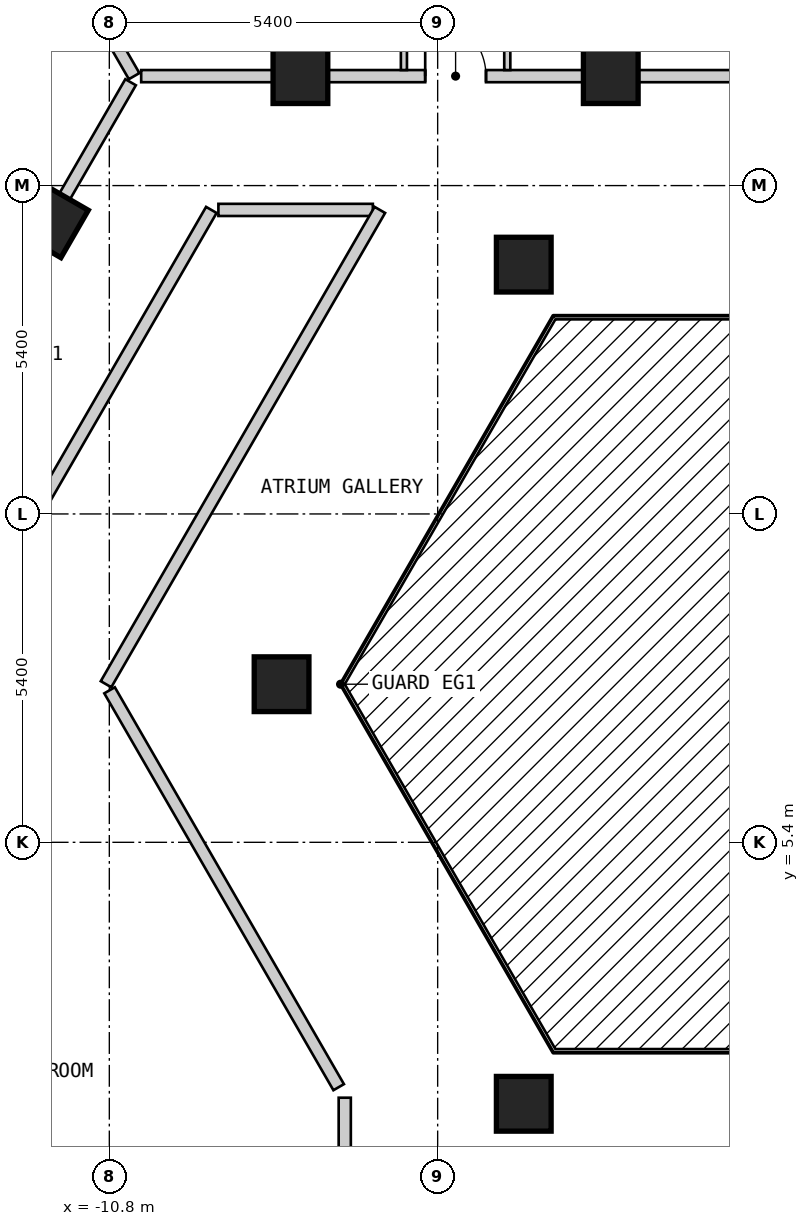
"""IFC4 building model, lengths in metres.
Left out: names, types, materials, properties, quantities, classifications, styles, units other than length and angle.
Written with IfcOpenShell. Run it as: python <this file> out.ifc"""

import sys

from ifc_helpers import new_model, si_unit, direction, frame, frame_2d, origin, origin_2d, place, context, subcontext, project, spatial, rectangle, extrude, element, fill, save


model = new_model("IFC4")
c1 = context("Model", 3, precision=1e-05, world=origin(), true_north=direction((0.0, 1.0)))
c2 = subcontext(c1, "Body", "Model", "MODEL_VIEW")
j1 = project(units=[si_unit("LENGTHUNIT", "METRE"), si_unit("PLANEANGLEUNIT", "RADIAN")], contexts=[c1])
p1 = place(None, origin())
s1 = spatial("IfcSite", under=j1, at=p1, CompositionType="ELEMENT")
p2 = place(p1, origin())
s2 = spatial("IfcBuilding", under=s1, at=p2, CompositionType="ELEMENT")
p3 = place(p2, frame((0.0, 0.0, 47.4)))
s3 = spatial("IfcBuildingStorey", under=s2, at=p3, CompositionType="ELEMENT", Elevation=47.4)
for number, where, z_axis, x_axis in (
    (1, (-2.553, 18.0, 0.0), (0.0, 0.0, 1.0), (-1.0, 0.0, 0.0)),
    (2, (-3.984, 14.9, 0.0), (0.0, 0.0, 1.0), (1.0, 0.0, 0.0)),
    (3, (-7.657, 18.0, 0.0), (0.0, 0.0, 1.0), (-1.0, 0.0, 0.0)),
    (4, (-11.761, 15.63, 0.0), (0.0, 0.0, 1.0), (-0.5, -0.866, 0.0)),
    (5, (-7.967, 8.0, 0.0), (0.0, 0.0, 1.0), (1.0, 0.0, 0.0)),
    (6, (-3.984, 1.1, 0.0), (0.0, 0.0, 1.0), (1.0, 0.0, 0.0)),
):
    element("IfcColumn", number, at=place(p3, frame(where, z_axis=z_axis, x_axis=x_axis)), inside=s3, PredefinedType="COLUMN", context=c2, shape_type="SweptSolid", body=[
        extrude(rectangle(XDim=0.9, YDim=0.9, at=origin_2d()), origin(), (0.0, 0.0, 1.0), 3.0),
    ])
p4 = place(p3, frame((-10.796, 7.9, 0.0), z_axis=(0.0, 0.0, 1.0), x_axis=(0.499954271211, -0.866051803703, 0.0)))
e7 = element("IfcWall", 7, at=p4, inside=s3, PredefinedType="PARTITIONING", context=c2, shape_type="SweptSolid", body=[
    extrude(rectangle(XDim=7.536, YDim=0.2, at=frame_2d((3.768, 0.0))), origin(), (0.0, 0.0, 1.0), 2.7),
])
p5 = place(p3, frame((-9.006, 15.8, 0.0), z_axis=(0.0, 0.0, 1.0), x_axis=(1.0, 0.0, 0.0)))
e8 = element("IfcWall", 8, at=p5, inside=s3, PredefinedType="PARTITIONING", context=c2, shape_type="SweptSolid", body=[
    extrude(rectangle(XDim=2.54, YDim=0.2, at=frame_2d((1.27, 0.0))), origin(), (0.0, 0.0, 1.0), 2.7),
])
p6 = place(p3, frame((-10.276, 18.0, 0.0), z_axis=(0.0, 0.0, 1.0), x_axis=(1.0, 0.0, 0.0)))
e9 = element("IfcWall", 9, at=p6, inside=s3, PredefinedType="PARTITIONING", context=c2, shape_type="SweptSolid", body=[
    extrude(rectangle(XDim=20.558, YDim=0.2, at=frame_2d((10.279, 0.0))), origin(), (0.0, 0.0, 1.0), 2.7),
])
p7 = place(p6, frame((19.265, 0.0, 0.0)))
e10 = element("IfcOpeningElement", 10, at=p7, cuts=e9, PredefinedType="OPENING", context=c2, shape_type="SweptSolid", body=[
    extrude(rectangle(XDim=1.0, YDim=2.1, at=frame_2d((0.5, 1.05))), frame((0.0, 0.11, 0.0), z_axis=(0.0, -1.0, 0.0), x_axis=(1.0, 0.0, 0.0)), (0.0, 0.0, 1.0), 0.22),
])
p8 = place(p6, frame((14.879, 0.0, 0.0)))
e11 = element("IfcOpeningElement", 11, at=p8, cuts=e9, PredefinedType="OPENING", context=c2, shape_type="SweptSolid", body=[
    extrude(rectangle(XDim=1.0, YDim=2.1, at=frame_2d((0.5, 1.05))), frame((0.0, 0.11, 0.0), z_axis=(0.0, -1.0, 0.0), x_axis=(1.0, 0.0, 0.0)), (0.0, 0.0, 1.0), 0.22),
])
p9 = place(p6, frame((4.671, 0.0, 0.0)))
e12 = element("IfcOpeningElement", 12, at=p9, cuts=e9, PredefinedType="OPENING", context=c2, shape_type="SweptSolid", body=[
    extrude(rectangle(XDim=1.0, YDim=2.1, at=frame_2d((0.5, 1.05))), frame((0.0, 0.11, 0.0), z_axis=(0.0, -1.0, 0.0), x_axis=(1.0, 0.0, 0.0)), (0.0, 0.0, 1.0), 0.22),
])
p10 = place(p3, frame((-10.854, 8.0, 0.0), z_axis=(0.0, 0.0, 1.0), x_axis=(0.499964141897, 0.86604610548, 0.0)))
e13 = element("IfcWall", 13, at=p10, inside=s3, PredefinedType="PARTITIONING", context=c2, shape_type="SweptSolid", body=[
    extrude(rectangle(XDim=9.007, YDim=0.2, at=frame_2d((4.503, 0.0))), origin(), (0.0, 0.0, 1.0), 2.7),
])
p11 = place(p3, frame((-18.244, -0.001, 0.0), z_axis=(0.0, 0.0, 1.0), x_axis=(0.499962999376, 0.866046765051, 0.0)))
e14 = element("IfcWall", 14, at=p11, inside=s3, PredefinedType="PARTITIONING", context=c2, shape_type="SweptSolid", body=[
    extrude(rectangle(XDim=18.245, YDim=0.2, at=frame_2d((9.123, 0.0))), origin(), (0.0, 0.0, 1.0), 2.7),
])
p12 = place(p11, frame((8.672, 0.0, 0.0)))
e15 = element("IfcOpeningElement", 15, at=p12, cuts=e14, PredefinedType="OPENING", context=c2, shape_type="SweptSolid", body=[
    extrude(rectangle(XDim=0.9, YDim=2.1, at=frame_2d((0.45, 1.05))), frame((0.0, 0.11, 0.0), z_axis=(0.0, -1.0, 0.0), x_axis=(1.0, 0.0, 0.0)), (0.0, 0.0, 1.0), 0.22),
])
p13 = place(p3, frame((-20.727, 0.099, 0.0), z_axis=(0.0, 0.0, 1.0), x_axis=(0.499993204491, 0.866029327138, 0.0)))
e16 = element("IfcWall", 16, at=p13, inside=s3, PredefinedType="PARTITIONING", context=c2, shape_type="SweptSolid", body=[
    extrude(rectangle(XDim=20.554, YDim=0.2, at=frame_2d((10.277, 0.0))), origin(), (0.0, 0.0, 1.0), 2.7),
])
p14 = place(p13, frame((14.88, 0.0, 0.0)))
e17 = element("IfcOpeningElement", 17, at=p14, cuts=e16, PredefinedType="OPENING", context=c2, shape_type="SweptSolid", body=[
    extrude(rectangle(XDim=1.0, YDim=2.1, at=frame_2d((0.5, 1.05))), frame((0.0, 0.11, 0.0), z_axis=(0.0, -1.0, 0.0), x_axis=(1.0, 0.0, 0.0)), (0.0, 0.0, 1.0), 0.22),
])
p15 = place(p13, frame((4.673, 0.0, 0.0)))
e18 = element("IfcOpeningElement", 18, at=p15, cuts=e16, PredefinedType="OPENING", context=c2, shape_type="SweptSolid", body=[
    extrude(rectangle(XDim=1.0, YDim=2.1, at=frame_2d((0.5, 1.05))), frame((0.0, 0.11, 0.0), z_axis=(0.0, -1.0, 0.0), x_axis=(1.0, 0.0, 0.0)), (0.0, 0.0, 1.0), 0.22),
])
p16 = place(p13, frame((0.838, 0.0, 0.0)))
e19 = element("IfcOpeningElement", 19, at=p16, cuts=e16, PredefinedType="OPENING", context=c2, shape_type="SweptSolid", body=[
    extrude(rectangle(XDim=0.8, YDim=2.1, at=frame_2d((0.4, 1.05))), frame((0.0, 0.11, 0.0), z_axis=(0.0, -1.0, 0.0), x_axis=(1.0, 0.0, 0.0)), (0.0, 0.0, 1.0), 0.22),
])
p17 = place(p3, frame((-6.928, -2.8, 0.0), z_axis=(0.0, 0.0, 1.0), x_axis=(0.0, 1.0, 0.0)))
e20 = element("IfcWall", 20, at=p17, inside=s3, PredefinedType="PARTITIONING", context=c2, shape_type="SweptSolid", body=[
    extrude(rectangle(XDim=4.0, YDim=0.2, at=frame_2d((2.0, 0.0))), origin(), (0.0, 0.0, 1.0), 2.7),
])
p18 = place(p3, frame((-4.255, 18.1, 0.0), z_axis=(0.0, 0.0, 1.0), x_axis=(0.0, 1.0, 0.0)))
e21 = element("IfcWall", 21, at=p18, inside=s3, PredefinedType="PARTITIONING", context=c2, shape_type="SweptSolid", body=[
    extrude(rectangle(XDim=4.05, YDim=0.1, at=frame_2d((2.025, 0.0))), origin(), (0.0, 0.0, 1.0), 2.7),
])
p19 = place(p18, frame((1.55, 0.0, 0.0)))
e22 = element("IfcOpeningElement", 22, at=p19, cuts=e21, PredefinedType="OPENING", context=c2, shape_type="SweptSolid", body=[
    extrude(rectangle(XDim=0.9, YDim=2.1, at=frame_2d((0.45, 1.05))), frame((0.0, 0.06, 0.0), z_axis=(0.0, -1.0, 0.0), x_axis=(1.0, 0.0, 0.0)), (0.0, 0.0, 1.0), 0.12),
])
p20 = place(p3, frame((-5.955, 18.1, 0.0), z_axis=(0.0, 0.0, 1.0), x_axis=(0.0, 1.0, 0.0)))
e23 = element("IfcWall", 23, at=p20, inside=s3, PredefinedType="PARTITIONING", context=c2, shape_type="SweptSolid", body=[
    extrude(rectangle(XDim=4.05, YDim=0.1, at=frame_2d((2.025, 0.0))), origin(), (0.0, 0.0, 1.0), 2.7),
])
p21 = place(p20, frame((1.6, 0.0, 0.0)))
e24 = element("IfcOpeningElement", 24, at=p21, cuts=e23, PredefinedType="OPENING", context=c2, shape_type="SweptSolid", body=[
    extrude(rectangle(XDim=0.8, YDim=2.1, at=frame_2d((0.4, 1.05))), frame((0.0, 0.06, 0.0), z_axis=(0.0, -1.0, 0.0), x_axis=(1.0, 0.0, 0.0)), (0.0, 0.0, 1.0), 0.12),
])
p22 = place(p3, frame((-7.657, 18.1, 0.0), z_axis=(0.0, 0.0, 1.0), x_axis=(0.0, 1.0, 0.0)))
e25 = element("IfcWall", 25, at=p22, inside=s3, PredefinedType="PARTITIONING", context=c2, shape_type="SweptSolid", body=[
    extrude(rectangle(XDim=4.1, YDim=0.1, at=frame_2d((2.05, 0.0))), origin(), (0.0, 0.0, 1.0), 2.7),
])
p23 = place(p3, frame((-12.659, 21.926, 0.0), z_axis=(0.0, 0.0, 1.0), x_axis=(0.500025458316, -0.86601070492, 0.0)))
e26 = element("IfcWall", 26, at=p23, inside=s3, PredefinedType="PARTITIONING", context=c2, shape_type="SweptSolid", body=[
    extrude(rectangle(XDim=4.533, YDim=0.2, at=frame_2d((2.267, 0.0))), origin(), (0.0, 0.0, 1.0), 2.7),
])
p24 = place(p3, frame((-2.553, 18.1, 0.0), z_axis=(0.0, 0.0, 1.0), x_axis=(0.0, 1.0, 0.0)))
e27 = element("IfcWall", 27, at=p24, inside=s3, PredefinedType="PARTITIONING", context=c2, shape_type="SweptSolid", body=[
    extrude(rectangle(XDim=3.5, YDim=0.2, at=frame_2d((1.75, 0.0))), origin(), (0.0, 0.0, 1.0), 2.7),
])
p25 = place(p9, origin())
e28 = element("IfcDoor", 28, at=p25, inside=s3, OperationType="SINGLE_SWING_LEFT", PredefinedType="DOOR", context=c2, shape_type="SweptSolid", body=[
    extrude(rectangle(XDim=1.0, YDim=2.1, at=frame_2d((0.5, 1.05))), frame((0.0, 0.025, 0.0), z_axis=(0.0, -1.0, 0.0), x_axis=(1.0, 0.0, 0.0)), (0.0, 0.0, 1.0), 0.05),
])
fill(e12, e28)
save(model, sys.argv[1])
